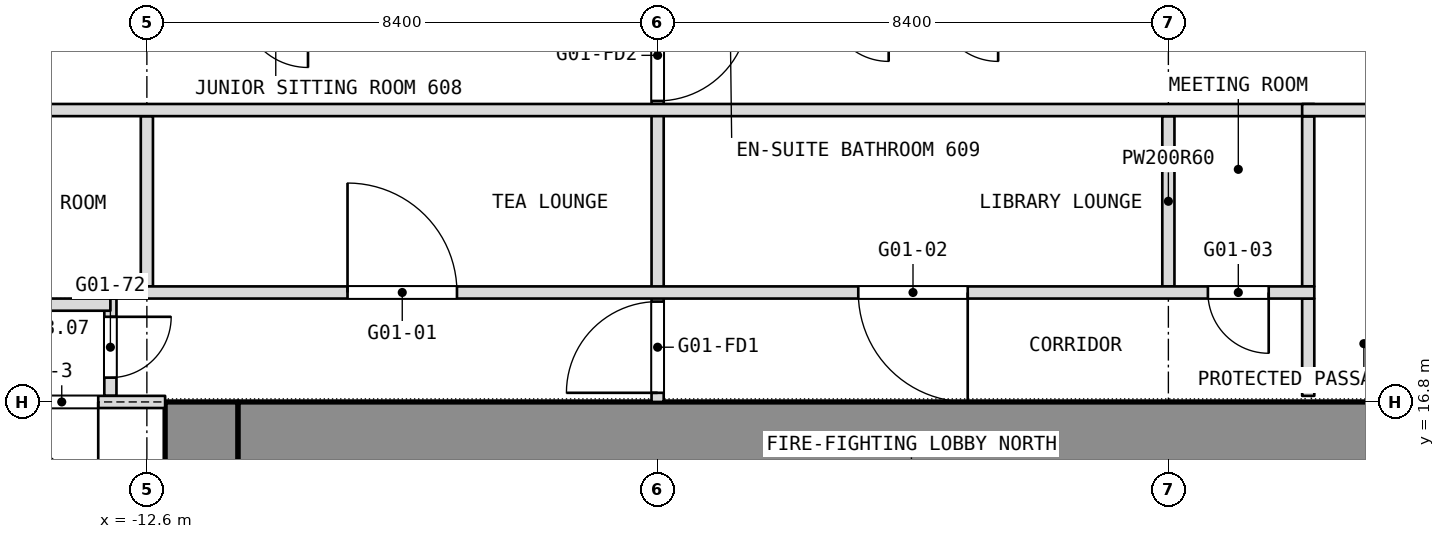
"""IFC4 building model, lengths in metres.
Left out: names, types, materials, properties, quantities, classifications, styles, units other than length and angle.
Written with IfcOpenShell. Run it as: python <this file> out.ifc"""

import sys

from ifc_helpers import new_model, si_unit, direction, frame, frame_2d, origin, place, context, subcontext, project, spatial, rectangle, extrude, element, fill, save


model = new_model("IFC4")
c1 = context("Model", 3, precision=1e-05, world=origin(), true_north=direction((0.0, 1.0)))
c2 = subcontext(c1, "Body", "Model", "MODEL_VIEW")
j1 = project(units=[si_unit("LENGTHUNIT", "METRE"), si_unit("PLANEANGLEUNIT", "RADIAN")], contexts=[c1])
p1 = place(None, origin())
s1 = spatial("IfcSite", under=j1, at=p1, CompositionType="ELEMENT")
p2 = place(p1, origin())
s2 = spatial("IfcBuilding", under=s1, at=p2, CompositionType="ELEMENT")
p3 = place(p2, frame((0.0, 0.0, 36.5)))
s3 = spatial("IfcBuildingStorey", under=s2, at=p3, CompositionType="ELEMENT", Elevation=36.5)
p4 = place(p3, frame((-11.7, 0.0, 0.0), z_axis=(0.0, 0.0, 1.0), x_axis=(0.0, 1.0, 0.0)))
e1 = element("IfcWall", 1, at=p4, inside=s3, PredefinedType="SHEAR", context=c2, shape_type="SweptSolid", body=[
    extrude(rectangle(XDim=16.8, YDim=1.2, at=frame_2d((8.4, 0.0))), origin(), (0.0, 0.0, 1.0), 3.6),
])
p5 = place(p4, frame((2.3, 0.0, 0.0)))
e2 = element("IfcOpeningElement", 2, at=p5, cuts=e1, PredefinedType="OPENING", context=c2, shape_type="SweptSolid", body=[
    extrude(rectangle(XDim=1.1, YDim=2.1, at=frame_2d((0.55, 1.05))), frame((0.0, 0.6, 0.0), z_axis=(0.0, -1.0, 0.0), x_axis=(1.0, 0.0, 0.0)), (0.0, 0.0, 1.0), 1.2),
])
p6 = place(p4, frame((4.85, 0.0, 0.0)))
e3 = element("IfcOpeningElement", 3, at=p6, cuts=e1, PredefinedType="OPENING", context=c2, shape_type="SweptSolid", body=[
    extrude(rectangle(XDim=1.1, YDim=2.1, at=frame_2d((0.55, 1.05))), frame((0.0, 0.6, 0.0), z_axis=(0.0, -1.0, 0.0), x_axis=(1.0, 0.0, 0.0)), (0.0, 0.0, 1.0), 1.2),
])
p7 = place(p4, frame((6.825, 0.0, 0.0)))
e4 = element("IfcOpeningElement", 4, at=p7, cuts=e1, PredefinedType="OPENING", context=c2, shape_type="SweptSolid", body=[
    extrude(rectangle(XDim=1.2, YDim=2.1, at=frame_2d((0.6, 1.05))), frame((0.0, 0.6, 0.0), z_axis=(0.0, -1.0, 0.0), x_axis=(1.0, 0.0, 0.0)), (0.0, 0.0, 1.0), 1.2),
])
p8 = place(p4, frame((13.4, 0.0, 0.0)))
e5 = element("IfcOpeningElement", 5, at=p8, cuts=e1, PredefinedType="OPENING", context=c2, shape_type="SweptSolid", body=[
    extrude(rectangle(XDim=1.1, YDim=2.1, at=frame_2d((0.55, 1.05))), frame((0.0, 0.6, 0.0), z_axis=(0.0, -1.0, 0.0), x_axis=(1.0, 0.0, 0.0)), (0.0, 0.0, 1.0), 1.2),
])
p9 = place(p4, frame((10.85, 0.0, 0.0)))
e6 = element("IfcOpeningElement", 6, at=p9, cuts=e1, PredefinedType="OPENING", context=c2, shape_type="SweptSolid", body=[
    extrude(rectangle(XDim=1.1, YDim=2.1, at=frame_2d((0.55, 1.05))), frame((0.0, 0.6, 0.0), z_axis=(0.0, -1.0, 0.0), x_axis=(1.0, 0.0, 0.0)), (0.0, 0.0, 1.0), 1.2),
])
p10 = place(p4, frame((8.775, 0.0, 0.0)))
e7 = element("IfcOpeningElement", 7, at=p10, cuts=e1, PredefinedType="OPENING", context=c2, shape_type="SweptSolid", body=[
    extrude(rectangle(XDim=1.2, YDim=2.1, at=frame_2d((0.6, 1.05))), frame((0.0, 0.6, 0.0), z_axis=(0.0, -1.0, 0.0), x_axis=(1.0, 0.0, 0.0)), (0.0, 0.0, 1.0), 1.2),
])
p11 = place(p3, frame((-11.1, 16.2, 0.0), z_axis=(0.0, 0.0, 1.0), x_axis=(1.0, 0.0, 0.0)))
e8 = element("IfcWall", 8, at=p11, inside=s3, PredefinedType="SHEAR", context=c2, shape_type="SweptSolid", body=[
    extrude(rectangle(XDim=22.2, YDim=1.2, at=frame_2d((11.1, 0.0))), origin(), (0.0, 0.0, 1.0), 3.6),
])
p12 = place(p3, frame((6.5, 18.7, 0.0), z_axis=(0.0, 0.0, 1.0), x_axis=(0.0, 1.0, 0.0)))
e9 = element("IfcWall", 9, at=p12, inside=s3, PredefinedType="PARTITIONING", context=c2, shape_type="SweptSolid", body=[
    extrude(rectangle(XDim=2.8, YDim=0.2, at=frame_2d((1.4, 0.0))), origin(), (0.0, 0.0, 1.0), 3.34),
])
p13 = place(p3, frame((6.5, 16.9, 0.0), z_axis=(0.0, 0.0, 1.0), x_axis=(0.0, 1.0, 0.0)))
e10 = element("IfcWall", 10, at=p13, inside=s3, PredefinedType="PARTITIONING", context=c2, shape_type="SweptSolid", body=[
    extrude(rectangle(XDim=1.6, YDim=0.2, at=frame_2d((0.8, 0.0))), origin(), (0.0, 0.0, 1.0), 3.34),
])
p14 = place(p3, frame((4.2, 18.7, 0.0), z_axis=(0.0, 0.0, 1.0), x_axis=(0.0, 1.0, 0.0)))
e11 = element("IfcWall", 11, at=p14, inside=s3, PredefinedType="PARTITIONING", context=c2, shape_type="SweptSolid", body=[
    extrude(rectangle(XDim=2.8, YDim=0.2, at=frame_2d((1.4, 0.0))), origin(), (0.0, 0.0, 1.0), 3.34),
])
p15 = place(p3, frame((-4.2, 16.8, 0.0), z_axis=(0.0, 0.0, 1.0), x_axis=(0.0, 1.0, 0.0)))
e12 = element("IfcWall", 12, at=p15, inside=s3, PredefinedType="PARTITIONING", context=c2, shape_type="SweptSolid", body=[
    extrude(rectangle(XDim=6.7, YDim=0.2, at=frame_2d((3.35, 0.0))), origin(), (0.0, 0.0, 1.0), 3.34),
])
p16 = place(p15, frame((0.15, 0.0, 0.0)))
e13 = element("IfcOpeningElement", 13, at=p16, cuts=e12, PredefinedType="OPENING", context=c2, shape_type="SweptSolid", body=[
    extrude(rectangle(XDim=1.5, YDim=2.1, at=frame_2d((0.75, 1.05))), frame((0.0, 0.1, 0.0), z_axis=(0.0, -1.0, 0.0), x_axis=(1.0, 0.0, 0.0)), (0.0, 0.0, 1.0), 0.2),
])
p17 = place(p15, frame((4.95, 0.0, 0.0)))
e14 = element("IfcOpeningElement", 14, at=p17, cuts=e12, PredefinedType="OPENING", context=c2, shape_type="SweptSolid", body=[
    extrude(rectangle(XDim=1.5, YDim=2.1, at=frame_2d((0.75, 1.05))), frame((0.0, 0.1, 0.0), z_axis=(0.0, -1.0, 0.0), x_axis=(1.0, 0.0, 0.0)), (0.0, 0.0, 1.0), 0.2),
])
p18 = place(p3, frame((-12.6, 18.7, 0.0), z_axis=(0.0, 0.0, 1.0), x_axis=(0.0, 1.0, 0.0)))
e15 = element("IfcWall", 15, at=p18, inside=s3, PredefinedType="PARTITIONING", context=c2, shape_type="SweptSolid", body=[
    extrude(rectangle(XDim=2.8, YDim=0.2, at=frame_2d((1.4, 0.0))), origin(), (0.0, 0.0, 1.0), 3.34),
])
p19 = place(p3, frame((-13.2, 16.9, 0.0), z_axis=(0.0, 0.0, 1.0), x_axis=(0.0, 1.0, 0.0)))
e16 = element("IfcWall", 16, at=p19, inside=s3, PredefinedType="PARTITIONING", context=c2, shape_type="SweptSolid", body=[
    extrude(rectangle(XDim=1.6, YDim=0.2, at=frame_2d((0.8, 0.0))), origin(), (0.0, 0.0, 1.0), 3.34),
])
p20 = place(p19, frame((0.3, 0.0, 0.0)))
e17 = element("IfcOpeningElement", 17, at=p20, cuts=e16, PredefinedType="OPENING", context=c2, shape_type="SweptSolid", body=[
    extrude(rectangle(XDim=1.0, YDim=2.1, at=frame_2d((0.5, 1.05))), frame((0.0, 0.1, 0.0), z_axis=(0.0, -1.0, 0.0), x_axis=(1.0, 0.0, 0.0)), (0.0, 0.0, 1.0), 0.2),
])
p21 = place(p3, frame((-18.2, 18.4, 0.0), z_axis=(0.0, 0.0, 1.0), x_axis=(1.0, 0.0, 0.0)))
e18 = element("IfcWall", 18, at=p21, inside=s3, PredefinedType="PARTITIONING", context=c2, shape_type="SweptSolid", body=[
    extrude(rectangle(XDim=5.0, YDim=0.2, at=frame_2d((2.5, 0.0))), origin(), (0.0, 0.0, 1.0), 3.34),
])
p22 = place(p3, frame((-13.2, 18.6, 0.0), z_axis=(0.0, 0.0, 1.0), x_axis=(1.0, 0.0, 0.0)))
e19 = element("IfcWall", 19, at=p22, inside=s3, PredefinedType="PARTITIONING", context=c2, shape_type="SweptSolid", body=[
    extrude(rectangle(XDim=19.8, YDim=0.2, at=frame_2d((9.9, 0.0))), origin(), (0.0, 0.0, 1.0), 3.34),
])
p23 = place(p22, frame((3.9, 0.0, 0.0)))
e20 = element("IfcOpeningElement", 20, at=p23, cuts=e19, PredefinedType="OPENING", context=c2, shape_type="SweptSolid", body=[
    extrude(rectangle(XDim=1.8, YDim=2.1, at=frame_2d((0.9, 1.05))), frame((0.0, 0.1, 0.0), z_axis=(0.0, -1.0, 0.0), x_axis=(1.0, 0.0, 0.0)), (0.0, 0.0, 1.0), 0.2),
])
p24 = place(p22, frame((12.3, 0.0, 0.0)))
e21 = element("IfcOpeningElement", 21, at=p24, cuts=e19, PredefinedType="OPENING", context=c2, shape_type="SweptSolid", body=[
    extrude(rectangle(XDim=1.8, YDim=2.1, at=frame_2d((0.9, 1.05))), frame((0.0, 0.1, 0.0), z_axis=(0.0, -1.0, 0.0), x_axis=(1.0, 0.0, 0.0)), (0.0, 0.0, 1.0), 0.2),
])
p25 = place(p22, frame((18.05, 0.0, 0.0)))
e22 = element("IfcOpeningElement", 22, at=p25, cuts=e19, PredefinedType="OPENING", context=c2, shape_type="SweptSolid", body=[
    extrude(rectangle(XDim=1.0, YDim=2.1, at=frame_2d((0.5, 1.05))), frame((0.0, 0.1, 0.0), z_axis=(0.0, -1.0, 0.0), x_axis=(1.0, 0.0, 0.0)), (0.0, 0.0, 1.0), 0.2),
])
p26 = place(p3, frame((-16.7, 21.6, 0.0), z_axis=(0.0, 0.0, 1.0), x_axis=(1.0, 0.0, 0.0)))
e23 = element("IfcWall", 23, at=p26, inside=s3, PredefinedType="PARTITIONING", context=c2, shape_type="SweptSolid", body=[
    extrude(rectangle(XDim=23.3, YDim=0.2, at=frame_2d((11.65, 0.0))), origin(), (0.0, 0.0, 1.0), 3.34),
])
p27 = place(p3, frame((6.4, 21.6, 0.0), z_axis=(0.0, 0.0, 1.0), x_axis=(1.0, 0.0, 0.0)))
e24 = element("IfcWall", 24, at=p27, inside=s3, PredefinedType="PARTITIONING", context=c2, shape_type="SweptSolid", body=[
    extrude(rectangle(XDim=1.6, YDim=0.2, at=frame_2d((0.8, 0.0))), origin(), (0.0, 0.0, 1.0), 3.34),
])
p28 = place(p3, frame((-16.7, 16.8, 0.0), z_axis=(0.0, 0.0, 1.0), x_axis=(1.0, 0.0, 0.0)))
e25 = element("IfcWall", 25, at=p28, inside=s3, PredefinedType="PARTITIONING", context=c2, shape_type="SweptSolid", body=[
    extrude(rectangle(XDim=4.4, YDim=0.2, at=frame_2d((2.2, 0.0))), origin(), (0.0, 0.0, 1.0), 2.84),
])
p29 = place(p28, frame((2.1, 0.0, 0.0)))
e26 = element("IfcOpeningElement", 26, at=p29, cuts=e25, PredefinedType="OPENING", context=c2, shape_type="SweptSolid", body=[
    extrude(rectangle(XDim=1.2, YDim=2.1, at=frame_2d((0.6, 1.05))), frame((0.0, 0.1, 0.0), z_axis=(0.0, -1.0, 0.0), x_axis=(1.0, 0.0, 0.0)), (0.0, 0.0, 1.0), 0.2),
])
p30 = place(p20, origin())
e27 = element("IfcDoor", 27, at=p30, inside=s3, OperationType="SINGLE_SWING_RIGHT", PredefinedType="DOOR", context=c2, shape_type="SweptSolid", body=[
    extrude(rectangle(XDim=1.0, YDim=2.1, at=frame_2d((0.5, 1.05))), frame((0.0, 0.025, 0.0), z_axis=(0.0, -1.0, 0.0), x_axis=(1.0, 0.0, 0.0)), (0.0, 0.0, 1.0), 0.05),
])
fill(e17, e27)
p31 = place(p23, origin())
e28 = element("IfcDoor", 28, at=p31, inside=s3, OperationType="DOUBLE_DOOR_SINGLE_SWING", PredefinedType="DOOR", context=c2, shape_type="SweptSolid", body=[
    extrude(rectangle(XDim=1.8, YDim=2.1, at=frame_2d((0.9, 1.05))), frame((0.0, 0.025, 0.0), z_axis=(0.0, -1.0, 0.0), x_axis=(1.0, 0.0, 0.0)), (0.0, 0.0, 1.0), 0.05),
])
fill(e20, e28)
p32 = place(p24, origin())
e29 = element("IfcDoor", 29, at=p32, inside=s3, OperationType="DOUBLE_DOOR_SINGLE_SWING", PredefinedType="DOOR", context=c2, shape_type="SweptSolid", body=[
    extrude(rectangle(XDim=1.8, YDim=2.1, at=frame_2d((0.9, 1.05))), frame((0.0, 0.025, 0.0), z_axis=(0.0, -1.0, 0.0), x_axis=(1.0, 0.0, 0.0)), (0.0, 0.0, 1.0), 0.05),
])
fill(e21, e29)
p33 = place(p25, origin())
e30 = element("IfcDoor", 30, at=p33, inside=s3, OperationType="SINGLE_SWING_LEFT", PredefinedType="DOOR", context=c2, shape_type="SweptSolid", body=[
    extrude(rectangle(XDim=1.0, YDim=2.1, at=frame_2d((0.5, 1.05))), frame((0.0, 0.025, 0.0), z_axis=(0.0, -1.0, 0.0), x_axis=(1.0, 0.0, 0.0)), (0.0, 0.0, 1.0), 0.05),
])
fill(e22, e30)
p34 = place(p29, origin())
e31 = element("IfcDoor", 31, at=p34, inside=s3, OperationType="SINGLE_SWING_LEFT", PredefinedType="DOOR", context=c2, shape_type="SweptSolid", body=[
    extrude(rectangle(XDim=1.2, YDim=2.1, at=frame_2d((0.6, 1.05))), frame((0.0, 0.025, 0.0), z_axis=(0.0, -1.0, 0.0), x_axis=(1.0, 0.0, 0.0)), (0.0, 0.0, 1.0), 0.05),
])
fill(e26, e31)
p35 = place(p16, origin())
e32 = element("IfcDoor", 32, at=p35, inside=s3, OperationType="DOUBLE_DOOR_DOUBLE_SWING", PredefinedType="DOOR", context=c2, shape_type="SweptSolid", body=[
    extrude(rectangle(XDim=1.5, YDim=2.1, at=frame_2d((0.75, 1.05))), frame((0.0, 0.025, 0.0), z_axis=(0.0, -1.0, 0.0), x_axis=(1.0, 0.0, 0.0)), (0.0, 0.0, 1.0), 0.05),
])
fill(e13, e32)
p36 = place(p17, origin())
e33 = element("IfcDoor", 33, at=p36, inside=s3, OperationType="DOUBLE_DOOR_DOUBLE_SWING", PredefinedType="DOOR", context=c2, shape_type="SweptSolid", body=[
    extrude(rectangle(XDim=1.5, YDim=2.1, at=frame_2d((0.75, 1.05))), frame((0.0, 0.025, 0.0), z_axis=(0.0, -1.0, 0.0), x_axis=(1.0, 0.0, 0.0)), (0.0, 0.0, 1.0), 0.05),
])
fill(e14, e33)
save(model, sys.argv[1])
